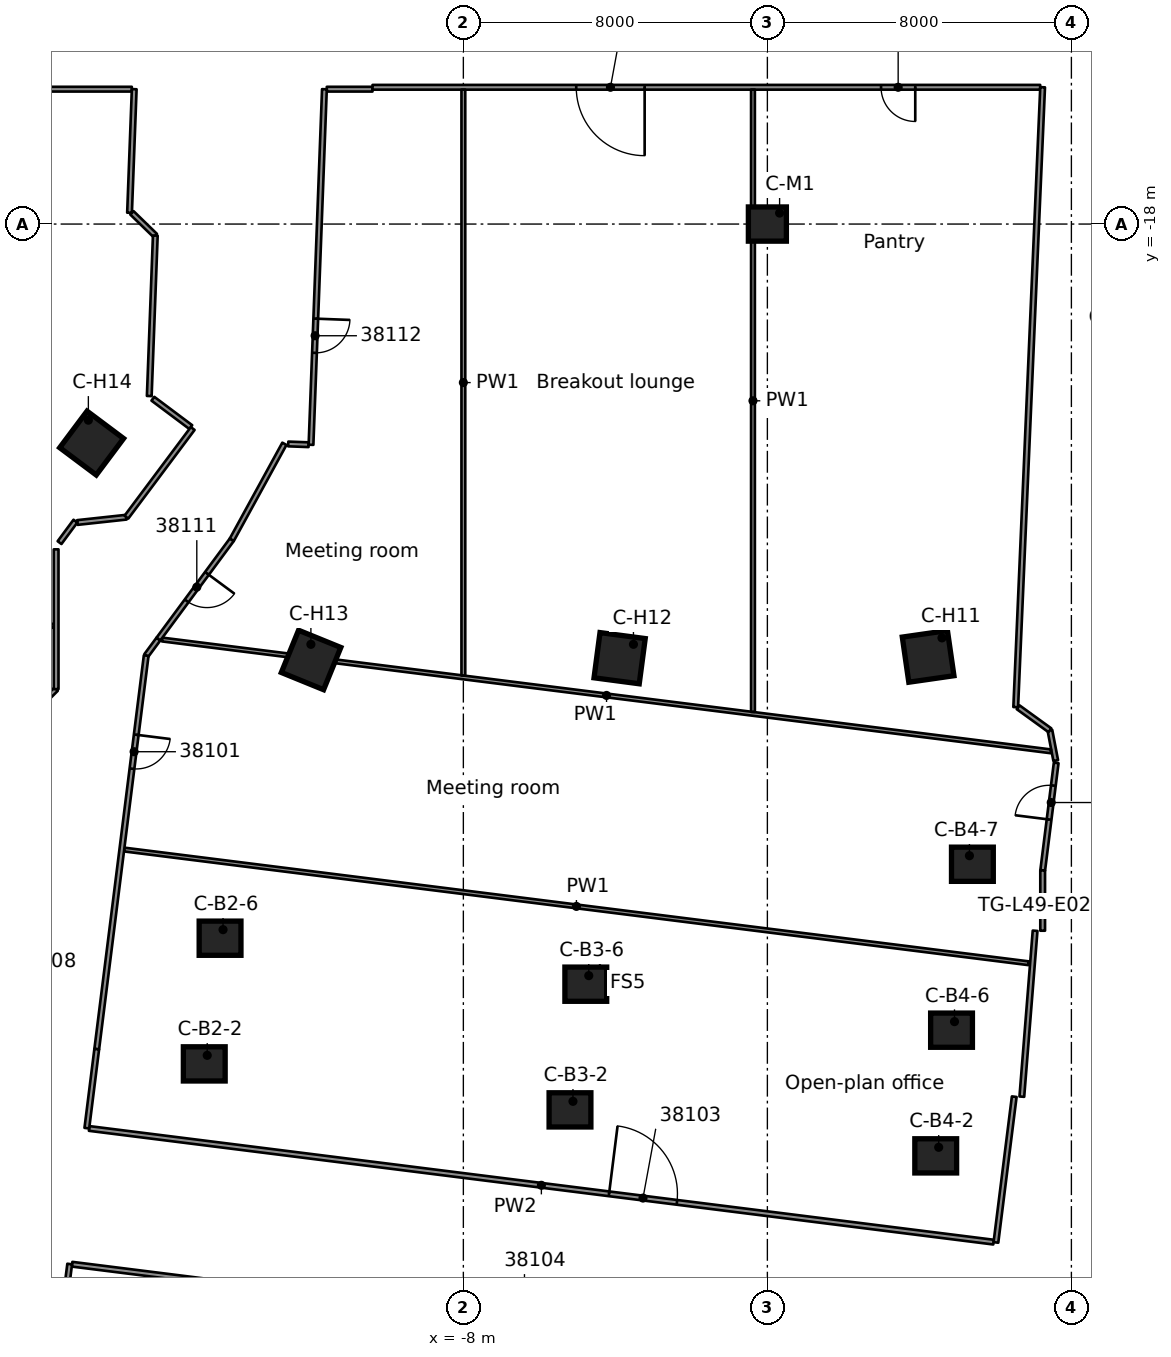
"""IFC4 building model, lengths in metres.
Left out: names, types, materials, properties, quantities, classifications, styles, units other than length and angle.
Written with IfcOpenShell. Run it as: python <this file> out.ifc"""

import sys

from ifc_helpers import new_model, si_unit, direction, frame, frame_2d, origin, origin_2d, place, context, subcontext, project, spatial, rectangle, extrude, element, fill, save


model = new_model("IFC4")
c1 = context("Model", 3, precision=1e-05, world=origin(), true_north=direction((0.0, 1.0)))
c2 = subcontext(c1, "Body", "Model", "MODEL_VIEW")
j1 = project(units=[si_unit("LENGTHUNIT", "METRE"), si_unit("PLANEANGLEUNIT", "RADIAN")], contexts=[c1])
p1 = place(None, origin())
s1 = spatial("IfcSite", under=j1, at=p1, CompositionType="ELEMENT")
p2 = place(p1, origin())
s2 = spatial("IfcBuilding", under=s1, at=p2, CompositionType="ELEMENT")
p3 = place(p2, frame((0.0, 0.0, 188.6)))
s3 = spatial("IfcBuildingStorey", under=s2, at=p3, CompositionType="ELEMENT", Elevation=188.6)
for number, where, z_axis, x_axis in (
    (1, (-14.818, -40.098, 0.0), (0.0, 0.0, 1.0), (1.0, 0.0, 0.0)),
    (2, (-14.402, -36.791, 0.0), (0.0, 0.0, 1.0), (1.0, 0.0, 0.0)),
    (3, (-5.194, -41.308, 0.0), (0.0, 0.0, 1.0), (1.0, 0.0, 0.0)),
    (4, (-4.778, -38.001, 0.0), (0.0, 0.0, 1.0), (1.0, 0.0, 0.0)),
    (5, (4.43, -42.518, 0.0), (0.0, 0.0, 1.0), (1.0, 0.0, 0.0)),
    (6, (4.846, -39.211, 0.0), (0.0, 0.0, 1.0), (1.0, 0.0, 0.0)),
    (7, (5.395, -34.845, 0.0), (0.0, 0.0, 1.0), (1.0, 0.0, 0.0)),
):
    element("IfcColumn", number, at=place(p3, frame(where, z_axis=z_axis, x_axis=x_axis)), inside=s3, PredefinedType="COLUMN", context=c2, shape_type="SweptSolid", body=[
        extrude(rectangle(XDim=1.1, YDim=0.9, at=origin_2d()), origin(), (0.0, 0.0, 1.0), 3.5),
    ])
for number, where, z_axis, x_axis in (
    (8, (4.23, -29.376, 0.0), (0.0, 0.0, 1.0), (0.143, -0.99, 0.0)),
    (9, (-3.888, -29.423, 0.0), (0.0, 0.0, 1.0), (-0.131, -0.991, 0.0)),
    (10, (-12.007, -29.47, 0.0), (0.0, 0.0, 1.0), (-0.377, -0.926, 0.0)),
    (11, (-17.781, -23.763, 0.0), (0.0, 0.0, 1.0), (-0.599, -0.801, 0.0)),
):
    element("IfcColumn", number, at=place(p3, frame(where, z_axis=z_axis, x_axis=x_axis)), inside=s3, PredefinedType="COLUMN", context=c2, shape_type="SweptSolid", body=[
        extrude(rectangle(XDim=1.2, YDim=1.2, at=origin_2d()), origin(), (0.0, 0.0, 1.0), 3.5),
    ])
p4 = place(p3, frame((0.0, -18.0, 0.0), z_axis=(0.0, 0.0, 1.0), x_axis=(1.0, 0.0, 0.0)))
e12 = element("IfcColumn", 12, at=p4, inside=s3, PredefinedType="COLUMN", context=c2, shape_type="SweptSolid", body=[
    extrude(rectangle(XDim=1.0, YDim=0.9, at=origin_2d()), origin(), (0.0, 0.0, 1.0), 3.5),
])
p5 = place(p3, frame((7.588, -32.118, 0.0), z_axis=(0.0, 0.0, 1.0), x_axis=(-0.188133951959, 0.982143378596, 0.0)))
e13 = element("IfcWall", 13, at=p5, inside=s3, PredefinedType="PARTITIONING", context=c2, shape_type="SweptSolid", body=[
    extrude(rectangle(XDim=0.812, YDim=0.125, at=frame_2d((0.406, 0.0))), origin(), (0.0, 0.0, 1.0), 3.06),
])
p6 = place(p3, frame((-18.157, -25.853, 0.0), z_axis=(0.0, 0.0, 1.0), x_axis=(0.994151491091, 0.107994503385, 0.0)))
e14 = element("IfcWall", 14, at=p6, inside=s3, PredefinedType="PARTITIONING", context=c2, shape_type="SweptSolid", body=[
    extrude(rectangle(XDim=1.298, YDim=0.125, at=frame_2d((0.649, 0.0))), origin(), (0.0, 0.0, 1.0), 3.06),
])
p7 = place(p3, frame((-16.17, -22.596, 0.0), z_axis=(0.0, 0.0, 1.0), x_axis=(0.800493304829, -0.5993416963, 0.0)))
e15 = element("IfcWall", 15, at=p7, inside=s3, PredefinedType="PARTITIONING", context=c2, shape_type="SweptSolid", body=[
    extrude(rectangle(XDim=1.247, YDim=0.125, at=frame_2d((0.623, 0.0))), origin(), (0.0, 0.0, 1.0), 3.06),
])
p8 = place(p3, frame((5.502, -48.361, 0.0), z_axis=(0.0, 0.0, 1.0), x_axis=(-0.992188044587, 0.124751289286, 0.0)))
e16 = element("IfcWall", 16, at=p8, inside=s3, PredefinedType="PARTITIONING", context=c2, shape_type="SweptSolid", body=[
    extrude(rectangle(XDim=23.985, YDim=0.125, at=frame_2d((11.993, 0.0))), origin(), (0.0, 0.0, 1.0), 3.06),
])
p9 = place(p8, frame((11.538, 0.0, 0.0)))
e17 = element("IfcOpeningElement", 17, at=p9, cuts=e16, PredefinedType="OPENING", context=c2, shape_type="SweptSolid", body=[
    extrude(rectangle(XDim=0.9, YDim=2.1, at=frame_2d((0.45, 1.05))), frame((0.0, 0.073, 0.0), z_axis=(0.0, -1.0, 0.0), x_axis=(1.0, 0.0, 0.0)), (0.0, 0.0, 1.0), 0.145),
])
p10 = place(p3, frame((-17.846, -41.797, 0.0), z_axis=(0.0, 0.0, 1.0), x_axis=(0.992194342851, -0.1247011869, 0.0)))
e18 = element("IfcWall", 18, at=p10, inside=s3, PredefinedType="PARTITIONING", context=c2, shape_type="SweptSolid", body=[
    extrude(rectangle(XDim=23.985, YDim=0.125, at=frame_2d((11.993, 0.0))), origin(), (0.0, 0.0, 1.0), 3.06),
])
p11 = place(p10, frame((13.788, 0.0, 0.0)))
e19 = element("IfcOpeningElement", 19, at=p11, cuts=e18, PredefinedType="OPENING", context=c2, shape_type="SweptSolid", body=[
    extrude(rectangle(XDim=1.8, YDim=2.1, at=frame_2d((0.9, 1.05))), frame((0.0, 0.073, 0.0), z_axis=(0.0, -1.0, 0.0), x_axis=(1.0, 0.0, 0.0)), (0.0, 0.0, 1.0), 0.145),
])
p12 = place(p3, frame((-16.924, -34.458, 0.0), z_axis=(0.0, 0.0, 1.0), x_axis=(0.992190096307, -0.124734970202, 0.0)))
e20 = element("IfcWall", 20, at=p12, inside=s3, PredefinedType="PARTITIONING", context=c2, shape_type="SweptSolid", body=[
    extrude(rectangle(XDim=23.986, YDim=0.1, at=frame_2d((11.993, 0.0))), origin(), (0.0, 0.0, 1.0), 3.06),
])
p13 = place(p3, frame((-23.703, -27.955, 0.0), z_axis=(0.0, 0.0, 1.0), x_axis=(0.992195935575, -0.124688513617, 0.0)))
e21 = element("IfcWall", 21, at=p13, inside=s3, PredefinedType="PARTITIONING", context=c2, shape_type="SweptSolid", body=[
    extrude(rectangle(XDim=4.964, YDim=0.1, at=frame_2d((2.482, 0.0))), origin(), (0.0, 0.0, 1.0), 3.06),
])
p14 = place(p3, frame((-15.925, -28.932, 0.0), z_axis=(0.0, 0.0, 1.0), x_axis=(0.992178923258, -0.124823812799, 0.0)))
e22 = element("IfcWall", 22, at=p14, inside=s3, PredefinedType="PARTITIONING", context=c2, shape_type="SweptSolid", body=[
    extrude(rectangle(XDim=23.57, YDim=0.1, at=frame_2d((11.785, 0.0))), origin(), (0.0, 0.0, 1.0), 3.06),
])
p15 = place(p3, frame((6.598, -30.714, 0.0), z_axis=(0.0, 0.0, 1.0), x_axis=(0.810062066622, -0.586344138045, 0.0)))
e23 = element("IfcWall", 23, at=p15, inside=s3, PredefinedType="PARTITIONING", context=c2, shape_type="SweptSolid", body=[
    extrude(rectangle(XDim=1.033, YDim=0.125, at=frame_2d((0.517, 0.0))), origin(), (0.0, 0.0, 1.0), 3.06),
])
p16 = place(p3, frame((-12.608, -23.786, 0.0), z_axis=(0.0, 0.0, 1.0), x_axis=(0.999302933235, -0.037331590217, 0.0)))
e24 = element("IfcWall", 24, at=p16, inside=s3, PredefinedType="PARTITIONING", context=c2, shape_type="SweptSolid", body=[
    extrude(rectangle(XDim=0.536, YDim=0.125, at=frame_2d((0.268, 0.0))), origin(), (0.0, 0.0, 1.0), 3.06),
])
p17 = place(p3, frame((-16.721, -17.705, 0.0), z_axis=(0.0, 0.0, 1.0), x_axis=(0.716998870517, -0.697074328661, 0.0)))
e25 = element("IfcWall", 25, at=p17, inside=s3, PredefinedType="PARTITIONING", context=c2, shape_type="SweptSolid", body=[
    extrude(rectangle(XDim=0.858, YDim=0.125, at=frame_2d((0.429, 0.0))), origin(), (0.0, 0.0, 1.0), 3.06),
])
p18 = place(p3, frame((-19.182, -30.703, 0.0), z_axis=(0.0, 0.0, 1.0), x_axis=(0.707106781187, 0.707106781187, 0.0)))
e26 = element("IfcWall", 26, at=p18, inside=s3, PredefinedType="PARTITIONING", context=c2, shape_type="SweptSolid", body=[
    extrude(rectangle(XDim=0.659, YDim=0.125, at=frame_2d((0.329, 0.0))), origin(), (0.0, 0.0, 1.0), 3.06),
])
p19 = place(p3, frame((-21.387, -14.451, 0.0), z_axis=(0.0, 0.0, 1.0), x_axis=(1.0, 0.0, 0.0)))
e27 = element("IfcWall", 27, at=p19, inside=s3, PredefinedType="PARTITIONING", context=c2, shape_type="SweptSolid", body=[
    extrude(rectangle(XDim=4.663, YDim=0.125, at=frame_2d((2.332, 0.0))), origin(), (0.0, 0.0, 1.0), 3.06),
])
p20 = place(p3, frame((-11.594, -14.451, 0.0), z_axis=(0.0, 0.0, 1.0), x_axis=(1.0, 0.0, 0.0)))
e28 = element("IfcWall", 28, at=p20, inside=s3, PredefinedType="PARTITIONING", context=c2, shape_type="SweptSolid", body=[
    extrude(rectangle(XDim=1.203, YDim=0.125, at=frame_2d((0.602, 0.0))), origin(), (0.0, 0.0, 1.0), 3.06),
])
p21 = place(p3, frame((7.179, -14.401, 0.0), z_axis=(0.0, 0.0, 1.0), x_axis=(-1.0, 0.0, 0.0)))
e29 = element("IfcWall", 29, at=p21, inside=s3, PredefinedType="PARTITIONING", context=c2, shape_type="SweptSolid", body=[
    extrude(rectangle(XDim=17.569, YDim=0.125, at=frame_2d((8.784, 0.0))), origin(), (0.0, 0.0, 1.0), 3.06),
])
p22 = place(p21, frame((10.408, 0.0, 0.0)))
e30 = element("IfcOpeningElement", 30, at=p22, cuts=e29, PredefinedType="OPENING", context=c2, shape_type="SweptSolid", body=[
    extrude(rectangle(XDim=1.8, YDim=2.1, at=frame_2d((0.9, 1.05))), frame((0.0, 0.073, 0.0), z_axis=(0.0, -1.0, 0.0), x_axis=(1.0, 0.0, 0.0)), (0.0, 0.0, 1.0), 0.145),
])
p23 = place(p21, frame((3.288, 0.0, 0.0)))
e31 = element("IfcOpeningElement", 31, at=p23, cuts=e29, PredefinedType="OPENING", context=c2, shape_type="SweptSolid", body=[
    extrude(rectangle(XDim=0.9, YDim=2.1, at=frame_2d((0.45, 1.05))), frame((0.0, 0.073, 0.0), z_axis=(0.0, -1.0, 0.0), x_axis=(1.0, 0.0, 0.0)), (0.0, 0.0, 1.0), 0.145),
])
p24 = place(p3, frame((-16.867, -25.713, 0.0), z_axis=(0.0, 0.0, 1.0), x_axis=(0.598926805965, 0.800803771905, 0.0)))
e32 = element("IfcWall", 32, at=p24, inside=s3, PredefinedType="PARTITIONING", context=c2, shape_type="SweptSolid", body=[
    extrude(rectangle(XDim=2.913, YDim=0.125, at=frame_2d((1.457, 0.0))), origin(), (0.0, 0.0, 1.0), 3.06),
])
p25 = place(p3, frame((-16.345, -29.354, 0.0), z_axis=(0.0, 0.0, 1.0), x_axis=(0.594632608772, 0.803997550111, 0.0)))
e33 = element("IfcWall", 33, at=p25, inside=s3, PredefinedType="PARTITIONING", context=c2, shape_type="SweptSolid", body=[
    extrude(rectangle(XDim=0.54, YDim=0.125, at=frame_2d((0.27, 0.0))), origin(), (0.0, 0.0, 1.0), 3.06),
])
p26 = place(p3, frame((-14.093, -26.307, 0.0), z_axis=(0.0, 0.0, 1.0), x_axis=(-0.594298094146, -0.80424484785, 0.0)))
e34 = element("IfcWall", 34, at=p26, inside=s3, PredefinedType="PARTITIONING", context=c2, shape_type="SweptSolid", body=[
    extrude(rectangle(XDim=3.249, YDim=0.125, at=frame_2d((1.625, 0.0))), origin(), (0.0, 0.0, 1.0), 3.06),
])
p27 = place(p26, frame((1.1, 0.0, 0.0)))
e35 = element("IfcOpeningElement", 35, at=p27, cuts=e34, PredefinedType="OPENING", context=c2, shape_type="SweptSolid", body=[
    extrude(rectangle(XDim=0.9, YDim=2.1, at=frame_2d((0.45, 1.05))), frame((0.0, 0.073, 0.0), z_axis=(0.0, -1.0, 0.0), x_axis=(1.0, 0.0, 0.0)), (0.0, 0.0, 1.0), 0.145),
])
p28 = place(p3, frame((-18.626, -26.382, 0.0), z_axis=(0.0, 0.0, 1.0), x_axis=(0.594596116481, 0.804024538348, 0.0)))
e36 = element("IfcWall", 36, at=p28, inside=s3, PredefinedType="PARTITIONING", context=c2, shape_type="SweptSolid", body=[
    extrude(rectangle(XDim=0.703, YDim=0.125, at=frame_2d((0.352, 0.0))), origin(), (0.0, 0.0, 1.0), 3.06),
])
p29 = place(p3, frame((-14.093, -26.307, 0.0), z_axis=(0.0, 0.0, 1.0), x_axis=(0.480674893903, 0.876898880357, 0.0)))
e37 = element("IfcWall", 37, at=p29, inside=s3, PredefinedType="PARTITIONING", context=c2, shape_type="SweptSolid", body=[
    extrude(rectangle(XDim=2.879, YDim=0.125, at=frame_2d((1.44, 0.0))), origin(), (0.0, 0.0, 1.0), 3.06),
])
p30 = place(p3, frame((9.585, -45.246, 0.0), z_axis=(0.0, 0.0, 1.0), x_axis=(-0.124682713734, -0.992196664425, 0.0)))
e38 = element("IfcWall", 38, at=p30, inside=s3, PredefinedType="PARTITIONING", context=c2, shape_type="SweptSolid", body=[
    extrude(rectangle(XDim=10.619, YDim=0.125, at=frame_2d((5.309, 0.0))), origin(), (0.0, 0.0, 1.0), 3.06),
])
p31 = place(p30, frame((0.6, 0.0, 0.0)))
e39 = element("IfcOpeningElement", 39, at=p31, cuts=e38, PredefinedType="OPENING", context=c2, shape_type="SweptSolid", body=[
    extrude(rectangle(XDim=1.1, YDim=2.1, at=frame_2d((0.55, 1.05))), frame((0.0, 0.073, 0.0), z_axis=(0.0, -1.0, 0.0), x_axis=(1.0, 0.0, 0.0)), (0.0, 0.0, 1.0), 0.145),
])
p32 = place(p30, frame((7.954, 0.0, 0.0)))
e40 = element("IfcOpeningElement", 40, at=p32, cuts=e38, PredefinedType="OPENING", context=c2, shape_type="SweptSolid", body=[
    extrude(rectangle(XDim=1.8, YDim=2.1, at=frame_2d((0.9, 1.05))), frame((0.0, 0.073, 0.0), z_axis=(0.0, -1.0, 0.0), x_axis=(1.0, 0.0, 0.0)), (0.0, 0.0, 1.0), 0.145),
])
p33 = place(p3, frame((6.496, -40.961, 0.0), z_axis=(0.0, 0.0, 1.0), x_axis=(-0.124749919043, -0.992188216872, 0.0)))
e41 = element("IfcWall", 41, at=p33, inside=s3, PredefinedType="PARTITIONING", context=c2, shape_type="SweptSolid", body=[
    extrude(rectangle(XDim=3.865, YDim=0.125, at=frame_2d((1.933, 0.0))), origin(), (0.0, 0.0, 1.0), 3.06),
])
p34 = place(p3, frame((7.045, -36.595, 0.0), z_axis=(0.0, 0.0, 1.0), x_axis=(-0.079672095143, -0.996821126008, 0.0)))
e42 = element("IfcWall", 42, at=p34, inside=s3, PredefinedType="PARTITIONING", context=c2, shape_type="SweptSolid", body=[
    extrude(rectangle(XDim=4.379, YDim=0.125, at=frame_2d((2.189, 0.0))), origin(), (0.0, 0.0, 1.0), 3.06),
])
p35 = place(p3, frame((7.245, -35.007, 0.0), z_axis=(0.0, 0.0, 1.0), x_axis=(0.124540735204, 0.992214495598, 0.0)))
e43 = element("IfcWall", 43, at=p35, inside=s3, PredefinedType="PARTITIONING", context=c2, shape_type="SweptSolid", body=[
    extrude(rectangle(XDim=2.85, YDim=0.125, at=frame_2d((1.425, 0.0))), origin(), (0.0, 0.0, 1.0), 3.06),
])
p36 = place(p35, frame((1.35, 0.0, 0.0)))
e44 = element("IfcOpeningElement", 44, at=p36, cuts=e43, PredefinedType="OPENING", context=c2, shape_type="SweptSolid", body=[
    extrude(rectangle(XDim=0.9, YDim=2.1, at=frame_2d((0.45, 1.05))), frame((0.0, 0.073, 0.0), z_axis=(0.0, -1.0, 0.0), x_axis=(1.0, 0.0, 0.0)), (0.0, 0.0, 1.0), 0.145),
])
p37 = place(p3, frame((-19.381, -53.5, 0.0), z_axis=(0.0, 0.0, 1.0), x_axis=(0.124661325918, 0.992199351854, 0.0)))
e45 = element("IfcWall", 45, at=p37, inside=s3, PredefinedType="PARTITIONING", context=c2, shape_type="SweptSolid", body=[
    extrude(rectangle(XDim=8.2, YDim=0.125, at=frame_2d((4.1, 0.0))), origin(), (0.0, 0.0, 1.0), 3.06),
])
p38 = place(p3, frame((-16.346, -29.355, 0.0), z_axis=(0.0, 0.0, 1.0), x_axis=(-0.124673942426, -0.992197766617, 0.0)))
e46 = element("IfcWall", 46, at=p38, inside=s3, PredefinedType="PARTITIONING", context=c2, shape_type="SweptSolid", body=[
    extrude(rectangle(XDim=10.435, YDim=0.125, at=frame_2d((5.218, 0.0))), origin(), (0.0, 0.0, 1.0), 3.06),
])
p39 = place(p38, frame((2.099, 0.0, 0.0)))
e47 = element("IfcOpeningElement", 47, at=p39, cuts=e46, PredefinedType="OPENING", context=c2, shape_type="SweptSolid", body=[
    extrude(rectangle(XDim=0.9, YDim=2.1, at=frame_2d((0.45, 1.05))), frame((0.0, 0.073, 0.0), z_axis=(0.0, -1.0, 0.0), x_axis=(1.0, 0.0, 0.0)), (0.0, 0.0, 1.0), 0.145),
])
p40 = place(p3, frame((-17.908, -41.789, 0.0), z_axis=(0.0, 0.0, 1.0), x_axis=(0.124493385896, 0.992220437639, 0.0)))
e48 = element("IfcWall", 48, at=p40, inside=s3, PredefinedType="PARTITIONING", context=c2, shape_type="SweptSolid", body=[
    extrude(rectangle(XDim=2.096, YDim=0.125, at=frame_2d((1.048, 0.0))), origin(), (0.0, 0.0, 1.0), 3.06),
])
p41 = place(p3, frame((6.535, -30.711, 0.0), z_axis=(0.0, 0.0, 1.0), x_axis=(0.043365841226, 0.999059259411, 0.0)))
e49 = element("IfcWall", 49, at=p41, inside=s3, PredefinedType="PARTITIONING", context=c2, shape_type="SweptSolid", body=[
    extrude(rectangle(XDim=16.326, YDim=0.125, at=frame_2d((8.163, 0.0))), origin(), (0.0, 0.0, 1.0), 3.06),
])
p42 = place(p3, frame((-11.656, -14.452, 0.0), z_axis=(0.0, 0.0, 1.0), x_axis=(-0.037705079582, -0.999288910663, 0.0)))
e50 = element("IfcWall", 50, at=p42, inside=s3, PredefinedType="PARTITIONING", context=c2, shape_type="SweptSolid", body=[
    extrude(rectangle(XDim=9.363, YDim=0.125, at=frame_2d((4.681, 0.0))), origin(), (0.0, 0.0, 1.0), 3.06),
])
p43 = place(p42, frame((6.041, 0.0, 0.0)))
e51 = element("IfcOpeningElement", 51, at=p43, cuts=e50, PredefinedType="OPENING", context=c2, shape_type="SweptSolid", body=[
    extrude(rectangle(XDim=0.9, YDim=2.1, at=frame_2d((0.45, 1.05))), frame((0.0, 0.073, 0.0), z_axis=(0.0, -1.0, 0.0), x_axis=(1.0, 0.0, 0.0)), (0.0, 0.0, 1.0), 0.145),
])
p44 = place(p3, frame((-16.265, -22.525, 0.0), z_axis=(0.0, 0.0, 1.0), x_axis=(0.037618643473, 0.999292168319, 0.0)))
e52 = element("IfcWall", 52, at=p44, inside=s3, PredefinedType="PARTITIONING", context=c2, shape_type="SweptSolid", body=[
    extrude(rectangle(XDim=4.225, YDim=0.125, at=frame_2d((2.112, 0.0))), origin(), (0.0, 0.0, 1.0), 3.06),
])
p45 = place(p3, frame((-16.784, -17.703, 0.0), z_axis=(0.0, 0.0, 1.0), x_axis=(0.037810780634, 0.999284916762, 0.0)))
e53 = element("IfcWall", 53, at=p45, inside=s3, PredefinedType="PARTITIONING", context=c2, shape_type="SweptSolid", body=[
    extrude(rectangle(XDim=3.254, YDim=0.125, at=frame_2d((1.627, 0.0))), origin(), (0.0, 0.0, 1.0), 3.06),
])
p46 = place(p3, frame((7.244, -36.594, 0.0), z_axis=(0.0, 0.0, 1.0), x_axis=(0.0, 1.0, 0.0)))
e54 = element("IfcWall", 54, at=p46, inside=s3, PredefinedType="PARTITIONING", context=c2, shape_type="SweptSolid", body=[
    extrude(rectangle(XDim=1.587, YDim=0.125, at=frame_2d((0.793, 0.0))), origin(), (0.0, 0.0, 1.0), 3.06),
])
p47 = place(p3, frame((-0.379, -30.838, 0.0), z_axis=(0.0, 0.0, 1.0), x_axis=(0.0, 1.0, 0.0)))
e55 = element("IfcWall", 55, at=p47, inside=s3, PredefinedType="PARTITIONING", context=c2, shape_type="SweptSolid", body=[
    extrude(rectangle(XDim=16.375, YDim=0.1, at=frame_2d((8.188, 0.0))), origin(), (0.0, 0.0, 1.0), 3.06),
])
p48 = place(p3, frame((-8.0, -29.879, 0.0), z_axis=(0.0, 0.0, 1.0), x_axis=(0.0, 1.0, 0.0)))
e56 = element("IfcWall", 56, at=p48, inside=s3, PredefinedType="PARTITIONING", context=c2, shape_type="SweptSolid", body=[
    extrude(rectangle(XDim=15.416, YDim=0.1, at=frame_2d((7.708, 0.0))), origin(), (0.0, 0.0, 1.0), 3.06),
])
p49 = place(p3, frame((-18.716, -30.237, 0.0), z_axis=(0.0, 0.0, 1.0), x_axis=(0.0, 1.0, 0.0)))
e57 = element("IfcWall", 57, at=p49, inside=s3, PredefinedType="PARTITIONING", context=c2, shape_type="SweptSolid", body=[
    extrude(rectangle(XDim=3.678, YDim=0.125, at=frame_2d((1.839, 0.0))), origin(), (0.0, 0.0, 1.0), 3.06),
])
p50 = place(p39, origin())
e58 = element("IfcDoor", 58, at=p50, inside=s3, OperationType="SINGLE_SWING_LEFT", PredefinedType="DOOR", context=c2, shape_type="SweptSolid", body=[
    extrude(rectangle(XDim=0.9, YDim=2.1, at=frame_2d((0.45, 1.05))), frame((0.0, 0.025, 0.0), z_axis=(0.0, -1.0, 0.0), x_axis=(1.0, 0.0, 0.0)), (0.0, 0.0, 1.0), 0.05),
])
fill(e47, e58)
p51 = place(p36, origin())
e59 = element("IfcDoor", 59, at=p51, inside=s3, OperationType="SINGLE_SWING_RIGHT", PredefinedType="DOOR", context=c2, shape_type="SweptSolid", body=[
    extrude(rectangle(XDim=0.9, YDim=2.1, at=frame_2d((0.45, 1.05))), frame((0.0, 0.025, 0.0), z_axis=(0.0, -1.0, 0.0), x_axis=(1.0, 0.0, 0.0)), (0.0, 0.0, 1.0), 0.05),
])
fill(e44, e59)
p52 = place(p11, origin())
e60 = element("IfcDoor", 60, at=p52, inside=s3, OperationType="DOUBLE_DOOR_SINGLE_SWING", PredefinedType="DOOR", context=c2, shape_type="SweptSolid", body=[
    extrude(rectangle(XDim=1.8, YDim=2.1, at=frame_2d((0.9, 1.05))), frame((0.0, 0.025, 0.0), z_axis=(0.0, -1.0, 0.0), x_axis=(1.0, 0.0, 0.0)), (0.0, 0.0, 1.0), 0.05),
])
fill(e19, e60)
p53 = place(p27, origin())
e61 = element("IfcDoor", 61, at=p53, inside=s3, OperationType="SINGLE_SWING_LEFT", PredefinedType="DOOR", context=c2, shape_type="SweptSolid", body=[
    extrude(rectangle(XDim=0.9, YDim=2.1, at=frame_2d((0.45, 1.05))), frame((0.0, 0.025, 0.0), z_axis=(0.0, -1.0, 0.0), x_axis=(1.0, 0.0, 0.0)), (0.0, 0.0, 1.0), 0.05),
])
fill(e35, e61)
p54 = place(p43, origin())
e62 = element("IfcDoor", 62, at=p54, inside=s3, OperationType="SINGLE_SWING_RIGHT", PredefinedType="DOOR", context=c2, shape_type="SweptSolid", body=[
    extrude(rectangle(XDim=0.9, YDim=2.1, at=frame_2d((0.45, 1.05))), frame((0.0, 0.025, 0.0), z_axis=(0.0, -1.0, 0.0), x_axis=(1.0, 0.0, 0.0)), (0.0, 0.0, 1.0), 0.05),
])
fill(e51, e62)
p55 = place(p22, origin())
e63 = element("IfcDoor", 63, at=p55, inside=s3, OperationType="DOUBLE_DOOR_SINGLE_SWING", PredefinedType="DOOR", context=c2, shape_type="SweptSolid", body=[
    extrude(rectangle(XDim=1.8, YDim=2.1, at=frame_2d((0.9, 1.05))), frame((0.0, 0.025, 0.0), z_axis=(0.0, -1.0, 0.0), x_axis=(1.0, 0.0, 0.0)), (0.0, 0.0, 1.0), 0.05),
])
fill(e30, e63)
p56 = place(p23, origin())
e64 = element("IfcDoor", 64, at=p56, inside=s3, OperationType="SINGLE_SWING_LEFT", PredefinedType="DOOR", context=c2, shape_type="SweptSolid", body=[
    extrude(rectangle(XDim=0.9, YDim=2.1, at=frame_2d((0.45, 1.05))), frame((0.0, 0.025, 0.0), z_axis=(0.0, -1.0, 0.0), x_axis=(1.0, 0.0, 0.0)), (0.0, 0.0, 1.0), 0.05),
])
fill(e31, e64)
save(model, sys.argv[1])
